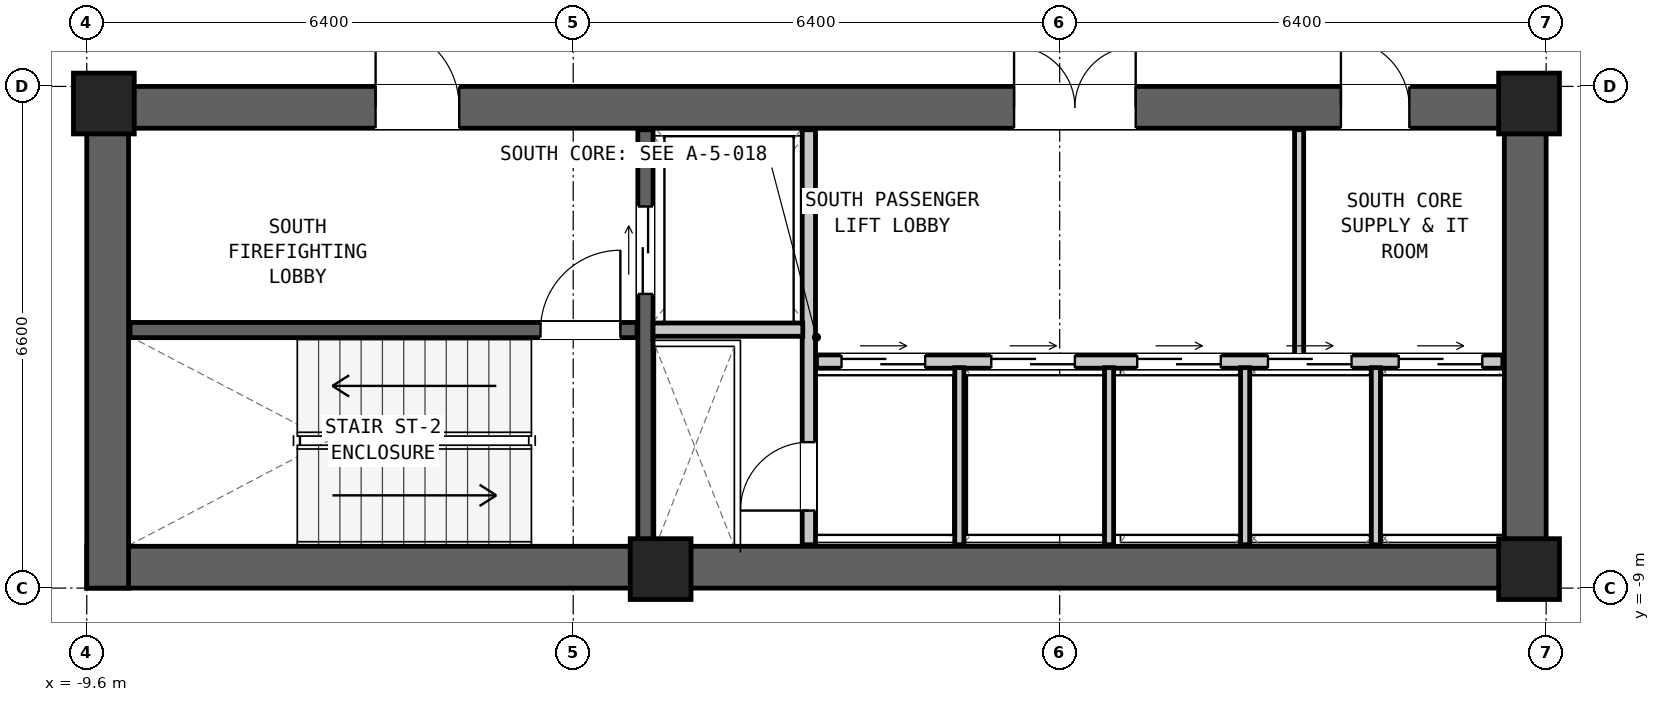
"""IFC4 building model, lengths in metres.
Left out: names, types, materials, properties, quantities, classifications, styles, units other than length and angle.
Written with IfcOpenShell. Run it as: python <this file> out.ifc"""

import sys

from ifc_helpers import new_model, si_unit, direction, frame, frame_2d, origin, origin_2d, place, context, subcontext, project, spatial, rectangle, extrude, element, fill, save


model = new_model("IFC4")
c1 = context("Model", 3, precision=1e-05, world=origin(), true_north=direction((0.0, 1.0)))
c2 = subcontext(c1, "Body", "Model", "MODEL_VIEW")
j1 = project(units=[si_unit("LENGTHUNIT", "METRE"), si_unit("PLANEANGLEUNIT", "RADIAN")], contexts=[c1])
p1 = place(None, origin())
s1 = spatial("IfcSite", under=j1, at=p1, CompositionType="ELEMENT")
p2 = place(p1, origin())
s2 = spatial("IfcBuilding", under=s1, at=p2, CompositionType="ELEMENT")
p3 = place(p2, frame((0.0, 0.0, 53.55)))
s3 = spatial("IfcBuildingStorey", under=s2, at=p3, CompositionType="ELEMENT", Elevation=53.55)
p4 = place(p3, frame((-9.6, -8.725, 0.0), z_axis=(0.0, 0.0, 1.0), x_axis=(1.0, 0.0, 0.0)))
e1 = element("IfcWall", 1, at=p4, inside=s3, PredefinedType="SHEAR", context=c2, shape_type="SweptSolid", body=[
    extrude(rectangle(XDim=19.2, YDim=0.55, at=frame_2d((9.6, 0.0))), origin(), (0.0, 0.0, 1.0), 4.35),
])
p5 = place(p3, frame((-9.6, -2.675, 0.0), z_axis=(0.0, 0.0, 1.0), x_axis=(1.0, 0.0, 0.0)))
e2 = element("IfcWall", 2, at=p5, inside=s3, PredefinedType="SHEAR", context=c2, shape_type="SweptSolid", body=[
    extrude(rectangle(XDim=19.2, YDim=0.55, at=frame_2d((9.6, 0.0))), origin(), (0.0, 0.0, 1.0), 4.35),
])
p6 = place(p5, frame((3.8, 0.0, 0.0)))
e3 = element("IfcOpeningElement", 3, at=p6, cuts=e2, PredefinedType="OPENING", context=c2, shape_type="SweptSolid", body=[
    extrude(rectangle(XDim=1.1, YDim=2.08, at=frame_2d((0.55, 1.04))), frame((0.0, 0.287, 0.0), z_axis=(0.0, -1.0, 0.0), x_axis=(1.0, 0.0, 0.0)), (0.0, 0.0, 1.0), 0.574),
])
p7 = place(p5, frame((12.2, 0.0, 0.0)))
e4 = element("IfcOpeningElement", 4, at=p7, cuts=e2, PredefinedType="OPENING", context=c2, shape_type="SweptSolid", body=[
    extrude(rectangle(XDim=1.6, YDim=2.12, at=frame_2d((0.8, 1.06))), frame((0.0, 0.287, 0.0), z_axis=(0.0, -1.0, 0.0), x_axis=(1.0, 0.0, 0.0)), (0.0, 0.0, 1.0), 0.574),
])
p8 = place(p5, frame((16.5, 0.0, 0.0)))
e5 = element("IfcOpeningElement", 5, at=p8, cuts=e2, PredefinedType="OPENING", context=c2, shape_type="SweptSolid", body=[
    extrude(rectangle(XDim=0.9, YDim=2.05, at=frame_2d((0.45, 1.025))), frame((0.0, 0.287, 0.0), z_axis=(0.0, -1.0, 0.0), x_axis=(1.0, 0.0, 0.0)), (0.0, 0.0, 1.0), 0.574),
])
for number, where, z_axis, x_axis in (
    (6, (-9.325, -9.0, 0.0), (0.0, 0.0, 1.0), (0.0, 1.0, 0.0)),
    (7, (9.325, -9.0, 0.0), (0.0, 0.0, 1.0), (0.0, 1.0, 0.0)),
):
    element("IfcWall", number, at=place(p3, frame(where, z_axis=z_axis, x_axis=x_axis)), inside=s3, PredefinedType="SHEAR", context=c2, shape_type="SweptSolid", body=[
        extrude(rectangle(XDim=6.6, YDim=0.55, at=frame_2d((3.3, 0.0))), origin(), (0.0, 0.0, 1.0), 4.35),
    ])
for number, where, z_axis, x_axis in (
    (8, (-9.375, -2.625, 0.0), (0.0, 0.0, 1.0), (1.0, 0.0, 0.0)),
    (9, (9.375, -2.625, 0.0), (0.0, 0.0, 1.0), (1.0, 0.0, 0.0)),
    (10, (-2.05, -8.75, 0.0), (0.0, 0.0, 1.0), (1.0, 0.0, 0.0)),
    (11, (9.375, -8.75, 0.0), (0.0, 0.0, 1.0), (1.0, 0.0, 0.0)),
):
    element("IfcColumn", number, at=place(p3, frame(where, z_axis=z_axis, x_axis=x_axis)), inside=s3, PredefinedType="COLUMN", context=c2, shape_type="SweptSolid", body=[
        extrude(rectangle(XDim=0.8, YDim=0.8, at=origin_2d()), origin(), (0.0, 0.0, 1.0), 4.35),
    ])
p9 = place(p3, frame((-9.03, -5.605, 0.0), z_axis=(0.0, 0.0, 1.0), x_axis=(1.0, 0.0, 0.0)))
e12 = element("IfcWall", 12, at=p9, inside=s3, PredefinedType="SHEAR", context=c2, shape_type="SweptSolid", body=[
    extrude(rectangle(XDim=6.67, YDim=0.2, at=frame_2d((3.335, 0.0))), origin(), (0.0, 0.0, 1.0), 4.07),
])
p10 = place(p9, frame((5.4, 0.0, 0.0)))
e13 = element("IfcOpeningElement", 13, at=p10, cuts=e12, PredefinedType="OPENING", context=c2, shape_type="SweptSolid", body=[
    extrude(rectangle(XDim=1.05, YDim=2.08, at=frame_2d((0.525, 1.04))), frame((0.0, 0.112, 0.0), z_axis=(0.0, -1.0, 0.0), x_axis=(1.0, 0.0, 0.0)), (0.0, 0.0, 1.0), 0.224),
])
p11 = place(p3, frame((-2.25, -8.43, 0.0), z_axis=(0.0, 0.0, 1.0), x_axis=(0.0, 1.0, 0.0)))
e14 = element("IfcWall", 14, at=p11, inside=s3, PredefinedType="SHEAR", context=c2, shape_type="SweptSolid", body=[
    extrude(rectangle(XDim=5.46, YDim=0.2, at=frame_2d((2.73, 0.0))), origin(), (0.0, 0.0, 1.0), 4.07),
])
p12 = place(p11, frame((3.3, 0.0, 0.0)))
e15 = element("IfcOpeningElement", 15, at=p12, cuts=e14, PredefinedType="OPENING", context=c2, shape_type="SweptSolid", body=[
    extrude(rectangle(XDim=1.15, YDim=2.08, at=frame_2d((0.575, 1.04))), frame((0.0, 0.112, 0.0), z_axis=(0.0, -1.0, 0.0), x_axis=(1.0, 0.0, 0.0)), (0.0, 0.0, 1.0), 0.224),
])
p13 = place(p3, frame((-0.1, -8.43, 0.0), z_axis=(0.0, 0.0, 1.0), x_axis=(0.0, 1.0, 0.0)))
e16 = element("IfcWall", 16, at=p13, inside=s3, PredefinedType="PARTITIONING", context=c2, shape_type="SweptSolid", body=[
    extrude(rectangle(XDim=5.46, YDim=0.175, at=frame_2d((2.73, 0.0))), origin(), (0.0, 0.0, 1.0), 4.07),
])
p14 = place(p13, frame((0.45, 0.0, 0.0)))
e17 = element("IfcOpeningElement", 17, at=p14, cuts=e16, PredefinedType="OPENING", context=c2, shape_type="SweptSolid", body=[
    extrude(rectangle(XDim=0.9, YDim=2.05, at=frame_2d((0.45, 1.025))), frame((0.0, 0.1, 0.0), z_axis=(0.0, -1.0, 0.0), x_axis=(1.0, 0.0, 0.0)), (0.0, 0.0, 1.0), 0.199),
])
p15 = place(p3, frame((-2.15, -5.6, 0.0), z_axis=(0.0, 0.0, 1.0), x_axis=(1.0, 0.0, 0.0)))
e18 = element("IfcWall", 18, at=p15, inside=s3, PredefinedType="PARTITIONING", context=c2, shape_type="SweptSolid", body=[
    extrude(rectangle(XDim=1.97, YDim=0.175, at=frame_2d((0.985, 0.0))), origin(), (0.0, 0.0, 1.0), 4.07),
])
p16 = place(p3, frame((0.0, -6.02, 0.0), z_axis=(0.0, 0.0, 1.0), x_axis=(1.0, 0.0, 0.0)))
e19 = element("IfcWall", 19, at=p16, inside=s3, PredefinedType="PARTITIONING", context=c2, shape_type="SweptSolid", body=[
    extrude(rectangle(XDim=9.03, YDim=0.175, at=frame_2d((4.515, 0.0))), origin(), (0.0, 0.0, 1.0), 4.07),
])
p17 = place(p16, frame((0.33, 0.0, 0.0)))
e20 = element("IfcOpeningElement", 20, at=p17, cuts=e19, PredefinedType="OPENING", context=c2, shape_type="SweptSolid", body=[
    extrude(rectangle(XDim=1.1, YDim=2.06, at=frame_2d((0.55, 1.03))), frame((0.0, 0.1, 0.0), z_axis=(0.0, -1.0, 0.0), x_axis=(1.0, 0.0, 0.0)), (0.0, 0.0, 1.0), 0.199),
])
p18 = place(p16, frame((2.3, 0.0, 0.0)))
e21 = element("IfcOpeningElement", 21, at=p18, cuts=e19, PredefinedType="OPENING", context=c2, shape_type="SweptSolid", body=[
    extrude(rectangle(XDim=1.1, YDim=2.06, at=frame_2d((0.55, 1.03))), frame((0.0, 0.1, 0.0), z_axis=(0.0, -1.0, 0.0), x_axis=(1.0, 0.0, 0.0)), (0.0, 0.0, 1.0), 0.199),
])
p19 = place(p16, frame((4.22, 0.0, 0.0)))
e22 = element("IfcOpeningElement", 22, at=p19, cuts=e19, PredefinedType="OPENING", context=c2, shape_type="SweptSolid", body=[
    extrude(rectangle(XDim=1.1, YDim=2.06, at=frame_2d((0.55, 1.03))), frame((0.0, 0.1, 0.0), z_axis=(0.0, -1.0, 0.0), x_axis=(1.0, 0.0, 0.0)), (0.0, 0.0, 1.0), 0.199),
])
p20 = place(p16, frame((5.94, 0.0, 0.0)))
e23 = element("IfcOpeningElement", 23, at=p20, cuts=e19, PredefinedType="OPENING", context=c2, shape_type="SweptSolid", body=[
    extrude(rectangle(XDim=1.1, YDim=2.06, at=frame_2d((0.55, 1.03))), frame((0.0, 0.1, 0.0), z_axis=(0.0, -1.0, 0.0), x_axis=(1.0, 0.0, 0.0)), (0.0, 0.0, 1.0), 0.199),
])
p21 = place(p16, frame((7.66, 0.0, 0.0)))
e24 = element("IfcOpeningElement", 24, at=p21, cuts=e19, PredefinedType="OPENING", context=c2, shape_type="SweptSolid", body=[
    extrude(rectangle(XDim=1.1, YDim=2.06, at=frame_2d((0.55, 1.03))), frame((0.0, 0.1, 0.0), z_axis=(0.0, -1.0, 0.0), x_axis=(1.0, 0.0, 0.0)), (0.0, 0.0, 1.0), 0.199),
])
for number, where, z_axis, x_axis in (
    (25, (1.88, -8.43, 0.0), (0.0, 0.0, 1.0), (0.0, 1.0, 0.0)),
    (26, (3.85, -8.43, 0.0), (0.0, 0.0, 1.0), (0.0, 1.0, 0.0)),
    (27, (5.64, -8.43, 0.0), (0.0, 0.0, 1.0), (0.0, 1.0, 0.0)),
    (28, (7.36, -8.43, 0.0), (0.0, 0.0, 1.0), (0.0, 1.0, 0.0)),
):
    element("IfcWall", number, at=place(p3, frame(where, z_axis=z_axis, x_axis=x_axis)), inside=s3, PredefinedType="PARTITIONING", context=c2, shape_type="SweptSolid", body=[
        extrude(rectangle(XDim=2.33, YDim=0.12, at=frame_2d((1.165, 0.0))), origin(), (0.0, 0.0, 1.0), 4.07),
    ])
p22 = place(p3, frame((6.35, -5.94, 0.0), z_axis=(0.0, 0.0, 1.0), x_axis=(0.0, 1.0, 0.0)))
e29 = element("IfcWall", 29, at=p22, inside=s3, PredefinedType="PARTITIONING", context=c2, shape_type="SweptSolid", body=[
    extrude(rectangle(XDim=2.97, YDim=0.12, at=frame_2d((1.485, 0.0))), origin(), (0.0, 0.0, 1.0), 4.07),
])
p23 = place(p10, origin())
e30 = element("IfcDoor", 30, at=p23, inside=s3, OperationType="SINGLE_SWING_RIGHT", PredefinedType="DOOR", context=c2, shape_type="SweptSolid", body=[
    extrude(rectangle(XDim=1.05, YDim=2.08, at=frame_2d((0.525, 1.04))), frame((0.0, 0.025, 0.0), z_axis=(0.0, -1.0, 0.0), x_axis=(1.0, 0.0, 0.0)), (0.0, 0.0, 1.0), 0.05),
])
fill(e13, e30)
p24 = place(p6, origin())
e31 = element("IfcDoor", 31, at=p24, inside=s3, OperationType="SINGLE_SWING_LEFT", PredefinedType="DOOR", context=c2, shape_type="SweptSolid", body=[
    extrude(rectangle(XDim=1.1, YDim=2.08, at=frame_2d((0.55, 1.04))), frame((0.0, 0.025, 0.0), z_axis=(0.0, -1.0, 0.0), x_axis=(1.0, 0.0, 0.0)), (0.0, 0.0, 1.0), 0.05),
])
fill(e3, e31)
p25 = place(p12, origin())
e32 = element("IfcDoor", 32, at=p25, inside=s3, OperationType="DOUBLE_DOOR_SLIDING", PredefinedType="DOOR", context=c2, shape_type="SweptSolid", body=[
    extrude(rectangle(XDim=1.15, YDim=2.08, at=frame_2d((0.575, 1.04))), frame((0.0, 0.025, 0.0), z_axis=(0.0, -1.0, 0.0), x_axis=(1.0, 0.0, 0.0)), (0.0, 0.0, 1.0), 0.05),
])
fill(e15, e32)
p26 = place(p14, origin())
e33 = element("IfcDoor", 33, at=p26, inside=s3, OperationType="SINGLE_SWING_LEFT", PredefinedType="DOOR", context=c2, shape_type="SweptSolid", body=[
    extrude(rectangle(XDim=0.9, YDim=2.05, at=frame_2d((0.45, 1.025))), frame((0.0, 0.025, 0.0), z_axis=(0.0, -1.0, 0.0), x_axis=(1.0, 0.0, 0.0)), (0.0, 0.0, 1.0), 0.05),
])
fill(e17, e33)
p27 = place(p7, origin())
e34 = element("IfcDoor", 34, at=p27, inside=s3, OperationType="DOUBLE_DOOR_SINGLE_SWING", PredefinedType="DOOR", context=c2, shape_type="SweptSolid", body=[
    extrude(rectangle(XDim=1.6, YDim=2.12, at=frame_2d((0.8, 1.06))), frame((0.0, 0.025, 0.0), z_axis=(0.0, -1.0, 0.0), x_axis=(1.0, 0.0, 0.0)), (0.0, 0.0, 1.0), 0.05),
])
fill(e4, e34)
p28 = place(p8, origin())
e35 = element("IfcDoor", 35, at=p28, inside=s3, OperationType="SINGLE_SWING_LEFT", PredefinedType="DOOR", context=c2, shape_type="SweptSolid", body=[
    extrude(rectangle(XDim=0.9, YDim=2.05, at=frame_2d((0.45, 1.025))), frame((0.0, 0.025, 0.0), z_axis=(0.0, -1.0, 0.0), x_axis=(1.0, 0.0, 0.0)), (0.0, 0.0, 1.0), 0.05),
])
fill(e5, e35)
p29 = place(p17, origin())
e36 = element("IfcDoor", 36, at=p29, inside=s3, OperationType="DOUBLE_DOOR_SLIDING", PredefinedType="DOOR", context=c2, shape_type="SweptSolid", body=[
    extrude(rectangle(XDim=1.1, YDim=2.06, at=frame_2d((0.55, 1.03))), frame((0.0, 0.025, 0.0), z_axis=(0.0, -1.0, 0.0), x_axis=(1.0, 0.0, 0.0)), (0.0, 0.0, 1.0), 0.05),
])
fill(e20, e36)
p30 = place(p18, origin())
e37 = element("IfcDoor", 37, at=p30, inside=s3, OperationType="DOUBLE_DOOR_SLIDING", PredefinedType="DOOR", context=c2, shape_type="SweptSolid", body=[
    extrude(rectangle(XDim=1.1, YDim=2.06, at=frame_2d((0.55, 1.03))), frame((0.0, 0.025, 0.0), z_axis=(0.0, -1.0, 0.0), x_axis=(1.0, 0.0, 0.0)), (0.0, 0.0, 1.0), 0.05),
])
fill(e21, e37)
p31 = place(p19, origin())
e38 = element("IfcDoor", 38, at=p31, inside=s3, OperationType="DOUBLE_DOOR_SLIDING", PredefinedType="DOOR", context=c2, shape_type="SweptSolid", body=[
    extrude(rectangle(XDim=1.1, YDim=2.06, at=frame_2d((0.55, 1.03))), frame((0.0, 0.025, 0.0), z_axis=(0.0, -1.0, 0.0), x_axis=(1.0, 0.0, 0.0)), (0.0, 0.0, 1.0), 0.05),
])
fill(e22, e38)
p32 = place(p20, origin())
e39 = element("IfcDoor", 39, at=p32, inside=s3, OperationType="DOUBLE_DOOR_SLIDING", PredefinedType="DOOR", context=c2, shape_type="SweptSolid", body=[
    extrude(rectangle(XDim=1.1, YDim=2.06, at=frame_2d((0.55, 1.03))), frame((0.0, 0.025, 0.0), z_axis=(0.0, -1.0, 0.0), x_axis=(1.0, 0.0, 0.0)), (0.0, 0.0, 1.0), 0.05),
])
fill(e23, e39)
p33 = place(p21, origin())
e40 = element("IfcDoor", 40, at=p33, inside=s3, OperationType="DOUBLE_DOOR_SLIDING", PredefinedType="DOOR", context=c2, shape_type="SweptSolid", body=[
    extrude(rectangle(XDim=1.1, YDim=2.06, at=frame_2d((0.55, 1.03))), frame((0.0, 0.025, 0.0), z_axis=(0.0, -1.0, 0.0), x_axis=(1.0, 0.0, 0.0)), (0.0, 0.0, 1.0), 0.05),
])
fill(e24, e40)
save(model, sys.argv[1])
